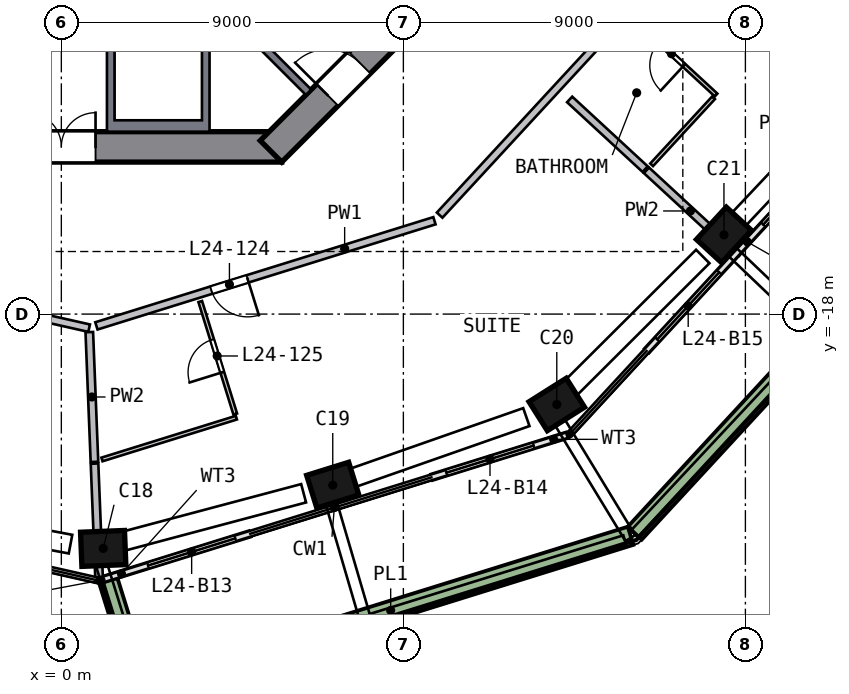
"""IFC4 building model, lengths in metres.
Left out: names, types, materials, properties, quantities, classifications, styles, units other than length and angle.
Written with IfcOpenShell. Run it as: python <this file> out.ifc"""

import sys

from ifc_helpers import new_model, si_unit, direction, frame, frame_2d, origin, origin_2d, place, context, subcontext, project, spatial, polyline, rectangle, outline, extrude, element, fill, save


model = new_model("IFC4")
c1 = context("Model", 3, precision=1e-05, world=origin(), true_north=direction((0.0, 1.0)))
c2 = subcontext(c1, "Body", "Model", "MODEL_VIEW")
j1 = project(units=[si_unit("LENGTHUNIT", "METRE"), si_unit("PLANEANGLEUNIT", "RADIAN")], contexts=[c1])
p1 = place(None, origin())
s1 = spatial("IfcSite", under=j1, at=p1, CompositionType="ELEMENT")
p2 = place(p1, origin())
s2 = spatial("IfcBuilding", under=s1, at=p2, CompositionType="ELEMENT")
p3 = place(p2, frame((0.0, 0.0, 103.5)))
s3 = spatial("IfcBuildingStorey", under=s2, at=p3, CompositionType="ELEMENT", Elevation=103.5)
p4 = place(p3, frame((0.962, -24.174, 0.0), z_axis=(0.114951301, 0.005549897, 0.993355625), x_axis=(-0.992571296, -0.039478608, 0.115081107)))
e1 = element("IfcColumn", 1, at=p4, inside=s3, PredefinedType="COLUMN", context=c2, shape_type="SweptSolid", body=[
    extrude(rectangle(XDim=1.15, YDim=0.9, at=origin_2d()), origin(), (0.0, 0.0, 1.0), 3.211),
])
p5 = place(p3, frame((7.013, -22.543, 0.0), z_axis=(0.106927204, 0.034222789, 0.993677701), x_axis=(0.948923521, 0.29485661, -0.112266336)))
e2 = element("IfcColumn", 2, at=p5, inside=s3, PredefinedType="COLUMN", context=c2, shape_type="SweptSolid", body=[
    extrude(rectangle(XDim=1.15, YDim=0.9, at=origin_2d()), origin(), (0.0, 0.0, 1.0), 3.21),
])
p6 = place(p3, frame((12.92, -20.454, 0.0), z_axis=(0.096705826, 0.062265779, 0.993363456), x_axis=(-0.839747489, -0.530656246, 0.115013491)))
e3 = element("IfcColumn", 3, at=p6, inside=s3, PredefinedType="COLUMN", context=c2, shape_type="SweptSolid", body=[
    extrude(rectangle(XDim=1.15, YDim=0.9, at=origin_2d()), origin(), (0.0, 0.0, 1.0), 3.211),
])
p7 = place(p3, frame((17.344, -16.016, 0.0), z_axis=(0.075517991, 0.083123025, 0.993673787), x_axis=(0.674399767, 0.729776299, -0.112300969)))
e4 = element("IfcColumn", 4, at=p7, inside=s3, PredefinedType="COLUMN", context=c2, shape_type="SweptSolid", body=[
    extrude(rectangle(XDim=1.15, YDim=0.9, at=origin_2d()), origin(), (0.0, 0.0, 1.0), 3.21),
])
p8 = place(p3, frame((-5.799, -13.6, 0.0), z_axis=(0.0, 0.0, 1.0), x_axis=(1.0, 0.0, 0.0)))
e5 = element("IfcWall", 5, at=p8, inside=s3, PredefinedType="SHEAR", context=c2, shape_type="SweptSolid", body=[
    extrude(rectangle(XDim=11.598, YDim=0.8, at=frame_2d((5.799, 0.0))), origin(), (0.0, 0.0, 1.0), 3.5),
])
p9 = place(p8, frame((4.899, 0.0, 0.0)))
e6 = element("IfcOpeningElement", 6, at=p9, cuts=e5, PredefinedType="OPENING", context=c2, shape_type="SweptSolid", body=[
    extrude(rectangle(XDim=1.8, YDim=2.1, at=frame_2d((0.9, 1.05))), frame((0.0, 0.41, 0.0), z_axis=(0.0, -1.0, 0.0), x_axis=(1.0, 0.0, 0.0)), (0.0, 0.0, 1.0), 0.82),
])
p10 = place(p3, frame((5.516, -13.717, 0.0), z_axis=(0.0, 0.0, 1.0), x_axis=(0.707106781, 0.707106781, 0.0)))
e7 = element("IfcWall", 7, at=p10, inside=s3, PredefinedType="SHEAR", context=c2, shape_type="SweptSolid", body=[
    extrude(rectangle(XDim=11.598, YDim=0.8, at=frame_2d((5.799, 0.0))), origin(), (0.0, 0.0, 1.0), 3.5),
])
p11 = place(p10, frame((2.099, 0.0, 0.0)))
e8 = element("IfcOpeningElement", 8, at=p11, cuts=e7, PredefinedType="OPENING", context=c2, shape_type="SweptSolid", body=[
    extrude(rectangle(XDim=1.2, YDim=2.1, at=frame_2d((0.6, 1.05))), frame((0.0, 0.41, 0.0), z_axis=(0.0, -1.0, 0.0), x_axis=(1.0, 0.0, 0.0)), (0.0, 0.0, 1.0), 0.82),
])
p12 = place(p3, frame((1.073, -24.993, 0.0), z_axis=(0.0, 0.0, 1.0), x_axis=(0.954852993, 0.297078713, 0.0)))
e9 = element("IfcWall", 9, at=p12, inside=s3, PredefinedType="SOLIDWALL", context=c2, shape_type="SweptSolid", body=[
    extrude(rectangle(XDim=4.068, YDim=0.15, at=frame_2d((2.034, 0.0))), origin(), (0.0, 0.0, 1.0), 2.425),
])
p13 = place(p12, frame((1.268, 0.0, 0.0)))
e10 = element("IfcOpeningElement", 10, at=p13, cuts=e9, PredefinedType="OPENING", context=c2, shape_type="SweptSolid", body=[
    extrude(rectangle(XDim=2.4, YDim=2.4, at=frame_2d((1.2, 1.2))), frame((0.0, 0.085, 0.0), z_axis=(0.0, -1.0, 0.0), x_axis=(1.0, 0.0, 0.0)), (0.0, 0.0, 1.0), 0.17),
])
p14 = place(p3, frame((9.752, -22.293, 0.0), z_axis=(0.0, 0.0, 1.0), x_axis=(0.954848066, 0.29709455, 0.0)))
e11 = element("IfcWall", 11, at=p14, inside=s3, PredefinedType="SOLIDWALL", context=c2, shape_type="SweptSolid", body=[
    extrude(rectangle(XDim=3.71, YDim=0.15, at=frame_2d((1.855, 0.0))), origin(), (0.0, 0.0, 1.0), 2.425),
])
p15 = place(p14, frame((0.4, 0.0, 0.0)))
e12 = element("IfcOpeningElement", 12, at=p15, cuts=e11, PredefinedType="OPENING", context=c2, shape_type="SweptSolid", body=[
    extrude(rectangle(XDim=2.4, YDim=2.4, at=frame_2d((1.2, 1.2))), frame((0.0, 0.085, 0.0), z_axis=(0.0, -1.0, 0.0), x_axis=(1.0, 0.0, 0.0)), (0.0, 0.0, 1.0), 0.17),
])
p16 = place(p3, frame((15.409, -18.959, 0.0), z_axis=(0.0, 0.0, 1.0), x_axis=(0.67837347, 0.734717248, 0.0)))
e13 = element("IfcWall", 13, at=p16, inside=s3, PredefinedType="SOLIDWALL", context=c2, shape_type="SweptSolid", body=[
    extrude(rectangle(XDim=3.475, YDim=0.15, at=frame_2d((1.738, 0.0))), origin(), (0.0, 0.0, 1.0), 2.425),
])
p17 = place(p16, frame((0.4, 0.0, 0.0)))
e14 = element("IfcOpeningElement", 14, at=p17, cuts=e13, PredefinedType="OPENING", context=c2, shape_type="SweptSolid", body=[
    extrude(rectangle(XDim=2.4, YDim=2.4, at=frame_2d((1.2, 1.2))), frame((0.0, 0.085, 0.0), z_axis=(0.0, -1.0, 0.0), x_axis=(1.0, 0.0, 0.0)), (0.0, 0.0, 1.0), 0.17),
])
p18 = place(p3, frame((17.767, -16.406, 0.0), z_axis=(0.0, 0.0, 1.0), x_axis=(0.678446633, 0.734649689, 0.0)))
e15 = element("IfcWall", 15, at=p18, inside=s3, PredefinedType="SOLIDWALL", context=c2, shape_type="SweptSolid", body=[
    extrude(rectangle(XDim=3.836, YDim=0.15, at=frame_2d((1.918, 0.0))), origin(), (0.0, 0.0, 1.0), 2.425),
])
p19 = place(p18, frame((1.035, 0.0, 0.0)))
e16 = element("IfcOpeningElement", 16, at=p19, cuts=e15, PredefinedType="OPENING", context=c2, shape_type="SweptSolid", body=[
    extrude(rectangle(XDim=2.4, YDim=2.4, at=frame_2d((1.2, 1.2))), frame((0.0, 0.085, 0.0), z_axis=(0.0, -1.0, 0.0), x_axis=(1.0, 0.0, 0.0)), (0.0, 0.0, 1.0), 0.17),
])
p20 = place(p3, frame((1.238, -25.021, 0.0), z_axis=(0.0, 0.0, 1.0), x_axis=(0.297114489, -0.954841862, 0.0)))
e17 = element("IfcWall", 17, at=p20, inside=s3, PredefinedType="SOLIDWALL", context=c2, shape_type="SweptSolid", body=[
    extrude(rectangle(XDim=3.199, YDim=0.5, at=frame_2d((1.6, 0.0))), origin(), (0.0, 0.0, 1.0), 0.7),
])
p21 = place(p3, frame((2.353, -27.762, 0.0), z_axis=(0.0, 0.0, 1.0), x_axis=(0.954869112, 0.297026901, 0.0)))
e18 = element("IfcWall", 18, at=p21, inside=s3, PredefinedType="SOLIDWALL", context=c2, shape_type="SweptSolid", body=[
    extrude(rectangle(XDim=13.223, YDim=0.5, at=frame_2d((6.612, 0.0))), origin(), (0.0, 0.0, 1.0), 0.7),
])
p22 = place(p3, frame((15.089, -23.765, 0.0), z_axis=(0.0, 0.0, 1.0), x_axis=(0.678421217, 0.734673161, 0.0)))
e19 = element("IfcWall", 19, at=p22, inside=s3, PredefinedType="SOLIDWALL", context=c2, shape_type="SweptSolid", body=[
    extrude(rectangle(XDim=13.723, YDim=0.5, at=frame_2d((6.862, 0.0))), origin(), (0.0, 0.0, 1.0), 0.7),
])
p23 = place(p3, origin())
e20 = element("IfcWall", 20, at=p23, inside=s3, PredefinedType="SOLIDWALL", context=c2, shape_type="SweptSolid", body=[
    extrude(outline(polyline([(3.9, -10.7), (3.9, -13.2), (1.2, -13.2), (1.2, -10.7), (3.9, -10.7)]), holes=[polyline([(1.4, -12.9), (3.7, -12.9), (3.7, -10.9), (1.4, -10.9), (1.4, -12.9)])]), origin(), (0.0, 0.0, 1.0), 3.19),
])
p24 = place(p3, frame((3.677, -9.334, 0.0), z_axis=(0.0, 0.0, 1.0), x_axis=(0.707106781, -0.707106781, 0.0)))
e21 = element("IfcWall", 21, at=p24, inside=s3, PredefinedType="SOLIDWALL", context=c2, shape_type="SweptSolid", body=[
    extrude(rectangle(XDim=4.0, YDim=0.2, at=frame_2d((2.0, 0.0))), origin(), (0.0, 0.0, 1.0), 3.19),
])
p25 = place(p3, frame((0.731, -18.37, 0.0), z_axis=(0.0, 0.0, 1.0), x_axis=(-0.9754634, 0.220161658, 0.0)))
e22 = element("IfcWall", 22, at=p25, inside=s3, PredefinedType="SOLIDWALL", context=c2, shape_type="SweptSolid", body=[
    extrude(rectangle(XDim=9.517, YDim=0.2, at=frame_2d((4.758, 0.0))), origin(), (0.0, 0.0, 1.0), 3.19),
])
p26 = place(p25, frame((1.9, 0.0, 0.0)))
e23 = element("IfcOpeningElement", 23, at=p26, cuts=e22, PredefinedType="OPENING", context=c2, shape_type="SweptSolid", body=[
    extrude(rectangle(XDim=1.0, YDim=2.1, at=frame_2d((0.5, 1.05))), frame((0.0, 0.11, 0.0), z_axis=(0.0, -1.0, 0.0), x_axis=(1.0, 0.0, 0.0)), (0.0, 0.0, 1.0), 0.22),
])
p27 = place(p3, frame((9.818, -15.543, 0.0), z_axis=(0.0, 0.0, 1.0), x_axis=(-0.954863879, -0.297043721, 0.0)))
e24 = element("IfcWall", 24, at=p27, inside=s3, PredefinedType="SOLIDWALL", context=c2, shape_type="SweptSolid", body=[
    extrude(rectangle(XDim=9.316, YDim=0.2, at=frame_2d((4.658, 0.0))), origin(), (0.0, 0.0, 1.0), 3.19),
])
p28 = place(p27, frame((5.15, 0.0, 0.0)))
e25 = element("IfcOpeningElement", 25, at=p28, cuts=e24, PredefinedType="OPENING", context=c2, shape_type="SweptSolid", body=[
    extrude(rectangle(XDim=1.0, YDim=2.1, at=frame_2d((0.5, 1.05))), frame((0.0, 0.11, 0.0), z_axis=(0.0, -1.0, 0.0), x_axis=(1.0, 0.0, 0.0)), (0.0, 0.0, 1.0), 0.22),
])
p29 = place(p3, frame((16.139, -8.698, 0.0), z_axis=(0.0, 0.0, 1.0), x_axis=(-0.678413568, -0.734680223, 0.0)))
e26 = element("IfcWall", 26, at=p29, inside=s3, PredefinedType="SOLIDWALL", context=c2, shape_type="SweptSolid", body=[
    extrude(rectangle(XDim=9.116, YDim=0.2, at=frame_2d((4.558, 0.0))), origin(), (0.0, 0.0, 1.0), 3.19),
])
p30 = place(p29, frame((0.35, 0.0, 0.0)))
e27 = element("IfcOpeningElement", 27, at=p30, cuts=e26, PredefinedType="OPENING", context=c2, shape_type="SweptSolid", body=[
    extrude(rectangle(XDim=1.0, YDim=2.1, at=frame_2d((0.5, 1.05))), frame((0.0, 0.11, 0.0), z_axis=(0.0, -1.0, 0.0), x_axis=(1.0, 0.0, 0.0)), (0.0, 0.0, 1.0), 0.22),
])
p31 = place(p3, frame((0.736, -18.474, 0.0), z_axis=(0.0, 0.0, 1.0), x_axis=(0.039779795, -0.999208471, 0.0)))
e28 = element("IfcWall", 28, at=p31, inside=s3, PredefinedType="SOLIDWALL", context=c2, shape_type="SweptSolid", body=[
    extrude(rectangle(XDim=3.418, YDim=0.2, at=frame_2d((1.709, 0.0))), origin(), (0.0, 0.0, 1.0), 3.19),
])
p32 = place(p3, frame((0.873, -21.935, 0.0), z_axis=(0.0, 0.0, 1.0), x_axis=(0.039806154, -0.999207421, 0.0)))
e29 = element("IfcWall", 29, at=p32, inside=s3, PredefinedType="SOLIDWALL", context=c2, shape_type="SweptSolid", body=[
    extrude(rectangle(XDim=3.011, YDim=0.2, at=frame_2d((1.506, 0.0))), origin(), (0.0, 0.0, 1.0), 3.19),
])
p33 = place(p3, frame((13.375, -12.351, 0.0), z_axis=(0.0, 0.0, 1.0), x_axis=(0.734709995, -0.678381326, 0.0)))
e30 = element("IfcWall", 30, at=p33, inside=s3, PredefinedType="SOLIDWALL", context=c2, shape_type="SweptSolid", body=[
    extrude(rectangle(XDim=2.705, YDim=0.2, at=frame_2d((1.352, 0.0))), origin(), (0.0, 0.0, 1.0), 3.19),
])
p34 = place(p3, frame((15.396, -14.217, 0.0), z_axis=(0.0, 0.0, 1.0), x_axis=(0.734663861, -0.678431287, 0.0)))
e31 = element("IfcWall", 31, at=p34, inside=s3, PredefinedType="SOLIDWALL", context=c2, shape_type="SweptSolid", body=[
    extrude(rectangle(XDim=3.152, YDim=0.2, at=frame_2d((1.576, 0.0))), origin(), (0.0, 0.0, 1.0), 3.19),
])
p35 = place(p3, frame((16.758, -8.805, 0.0), z_axis=(0.0, 0.0, 1.0), x_axis=(0.88523924, -0.465135989, 0.0)))
e32 = element("IfcWall", 32, at=p35, inside=s3, PredefinedType="SOLIDWALL", context=c2, shape_type="SweptSolid", body=[
    extrude(rectangle(XDim=6.034, YDim=0.2, at=frame_2d((3.017, 0.0))), origin(), (0.0, 0.0, 1.0), 3.19),
])
p36 = place(p3, frame((4.606, -20.726, 0.0), z_axis=(0.0, 0.0, 1.0), x_axis=(-0.954858023, -0.297062546, 0.0)))
e33 = element("IfcWall", 33, at=p36, inside=s3, PredefinedType="PARTITIONING", context=c2, shape_type="SweptSolid", body=[
    extrude(rectangle(XDim=3.704, YDim=0.1, at=frame_2d((1.852, 0.0))), origin(), (0.0, 0.0, 1.0), 3.19),
])
p37 = place(p3, frame((4.576, -20.63, 0.0), z_axis=(0.0, 0.0, 1.0), x_axis=(-0.297001126, 0.954877129, 0.0)))
e34 = element("IfcWall", 34, at=p37, inside=s3, PredefinedType="PARTITIONING", context=c2, shape_type="SweptSolid", body=[
    extrude(rectangle(XDim=3.1, YDim=0.1, at=frame_2d((1.55, 0.0))), origin(), (0.0, 0.0, 1.0), 3.19),
])
p38 = place(p37, frame((1.15, 0.0, 0.0)))
e35 = element("IfcOpeningElement", 35, at=p38, cuts=e34, PredefinedType="OPENING", context=c2, shape_type="SweptSolid", body=[
    extrude(rectangle(XDim=0.9, YDim=2.1, at=frame_2d((0.45, 1.05))), frame((0.0, 0.06, 0.0), z_axis=(0.0, -1.0, 0.0), x_axis=(1.0, 0.0, 0.0)), (0.0, 0.0, 1.0), 0.12),
])
p39 = place(p3, frame((17.229, -12.235, 0.0), z_axis=(0.0, 0.0, 1.0), x_axis=(-0.73466614, 0.678428819, 0.0)))
e36 = element("IfcWall", 36, at=p39, inside=s3, PredefinedType="PARTITIONING", context=c2, shape_type="SweptSolid", body=[
    extrude(rectangle(XDim=3.0, YDim=0.1, at=frame_2d((1.5, 0.0))), origin(), (0.0, 0.0, 1.0), 3.19),
])
p40 = place(p39, frame((1.15, 0.0, 0.0)))
e37 = element("IfcOpeningElement", 37, at=p40, cuts=e36, PredefinedType="OPENING", context=c2, shape_type="SweptSolid", body=[
    extrude(rectangle(XDim=0.9, YDim=2.1, at=frame_2d((0.45, 1.05))), frame((0.0, 0.06, 0.0), z_axis=(0.0, -1.0, 0.0), x_axis=(1.0, 0.0, 0.0)), (0.0, 0.0, 1.0), 0.12),
])
p41 = place(p3, frame((17.162, -12.308, 0.0), z_axis=(0.0, 0.0, 1.0), x_axis=(-0.67847442, -0.734624027, 0.0)))
e38 = element("IfcWall", 38, at=p41, inside=s3, PredefinedType="PARTITIONING", context=c2, shape_type="SweptSolid", body=[
    extrude(rectangle(XDim=2.4, YDim=0.1, at=frame_2d((1.2, 0.0))), origin(), (0.0, 0.0, 1.0), 3.19),
])
p42 = place(p13, origin())
e39 = element("IfcDoor", 39, at=p42, inside=s3, OperationType="SLIDING_TO_LEFT", PredefinedType="DOOR", context=c2, shape_type="SweptSolid", body=[
    extrude(rectangle(XDim=2.4, YDim=2.4, at=frame_2d((1.2, 1.2))), frame((0.0, 0.025, 0.0), z_axis=(0.0, -1.0, 0.0), x_axis=(1.0, 0.0, 0.0)), (0.0, 0.0, 1.0), 0.05),
])
fill(e10, e39)
p43 = place(p15, origin())
e40 = element("IfcDoor", 40, at=p43, inside=s3, OperationType="SLIDING_TO_RIGHT", PredefinedType="DOOR", context=c2, shape_type="SweptSolid", body=[
    extrude(rectangle(XDim=2.4, YDim=2.4, at=frame_2d((1.2, 1.2))), frame((0.0, 0.025, 0.0), z_axis=(0.0, -1.0, 0.0), x_axis=(1.0, 0.0, 0.0)), (0.0, 0.0, 1.0), 0.05),
])
fill(e12, e40)
p44 = place(p17, origin())
e41 = element("IfcDoor", 41, at=p44, inside=s3, OperationType="SLIDING_TO_RIGHT", PredefinedType="DOOR", context=c2, shape_type="SweptSolid", body=[
    extrude(rectangle(XDim=2.4, YDim=2.4, at=frame_2d((1.2, 1.2))), frame((0.0, 0.025, 0.0), z_axis=(0.0, -1.0, 0.0), x_axis=(1.0, 0.0, 0.0)), (0.0, 0.0, 1.0), 0.05),
])
fill(e14, e41)
p45 = place(p19, origin())
e42 = element("IfcDoor", 42, at=p45, inside=s3, OperationType="SLIDING_TO_LEFT", PredefinedType="DOOR", context=c2, shape_type="SweptSolid", body=[
    extrude(rectangle(XDim=2.4, YDim=2.4, at=frame_2d((1.2, 1.2))), frame((0.0, 0.025, 0.0), z_axis=(0.0, -1.0, 0.0), x_axis=(1.0, 0.0, 0.0)), (0.0, 0.0, 1.0), 0.05),
])
fill(e16, e42)
p46 = place(p9, origin())
e43 = element("IfcDoor", 43, at=p46, inside=s3, OperationType="DOUBLE_DOOR_SINGLE_SWING", PredefinedType="DOOR", context=c2, shape_type="SweptSolid", body=[
    extrude(rectangle(XDim=1.8, YDim=2.1, at=frame_2d((0.9, 1.05))), frame((0.0, 0.025, 0.0), z_axis=(0.0, -1.0, 0.0), x_axis=(1.0, 0.0, 0.0)), (0.0, 0.0, 1.0), 0.05),
])
fill(e6, e43)
p47 = place(p11, origin())
e44 = element("IfcDoor", 44, at=p47, inside=s3, OperationType="SINGLE_SWING_LEFT", PredefinedType="DOOR", context=c2, shape_type="SweptSolid", body=[
    extrude(rectangle(XDim=1.2, YDim=2.1, at=frame_2d((0.6, 1.05))), frame((0.0, 0.025, 0.0), z_axis=(0.0, -1.0, 0.0), x_axis=(1.0, 0.0, 0.0)), (0.0, 0.0, 1.0), 0.05),
])
fill(e8, e44)
p48 = place(p28, origin())
e45 = element("IfcDoor", 45, at=p48, inside=s3, OperationType="SINGLE_SWING_LEFT", PredefinedType="DOOR", context=c2, shape_type="SweptSolid", body=[
    extrude(rectangle(XDim=1.0, YDim=2.1, at=frame_2d((0.5, 1.05))), frame((0.0, 0.025, 0.0), z_axis=(0.0, -1.0, 0.0), x_axis=(1.0, 0.0, 0.0)), (0.0, 0.0, 1.0), 0.05),
])
fill(e25, e45)
p49 = place(p38, origin())
e46 = element("IfcDoor", 46, at=p49, inside=s3, OperationType="SINGLE_SWING_LEFT", PredefinedType="DOOR", context=c2, shape_type="SweptSolid", body=[
    extrude(rectangle(XDim=0.9, YDim=2.1, at=frame_2d((0.45, 1.05))), frame((0.0, 0.025, 0.0), z_axis=(0.0, -1.0, 0.0), x_axis=(1.0, 0.0, 0.0)), (0.0, 0.0, 1.0), 0.05),
])
fill(e35, e46)
p50 = place(p40, origin())
e47 = element("IfcDoor", 47, at=p50, inside=s3, OperationType="SINGLE_SWING_LEFT", PredefinedType="DOOR", context=c2, shape_type="SweptSolid", body=[
    extrude(rectangle(XDim=0.9, YDim=2.1, at=frame_2d((0.45, 1.05))), frame((0.0, 0.025, 0.0), z_axis=(0.0, -1.0, 0.0), x_axis=(1.0, 0.0, 0.0)), (0.0, 0.0, 1.0), 0.05),
])
fill(e37, e47)
save(model, sys.argv[1])
